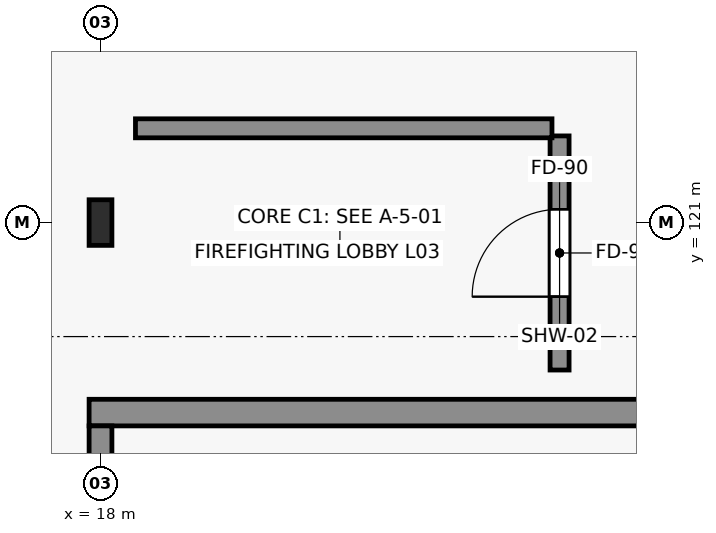
"""IFC4 building model, lengths in metres.
Left out: names, types, materials, properties, quantities, classifications, styles, units other than length and angle.
Written with IfcOpenShell. Run it as: python <this file> out.ifc"""

import sys

from ifc_helpers import new_model, si_unit, direction, frame, frame_2d, origin, origin_2d, place, context, subcontext, project, spatial, rectangle, i_section, extrude, element, fill, save


model = new_model("IFC4")
c1 = context("Model", 3, precision=1e-05, world=origin(), true_north=direction((0.0, 1.0)))
c2 = subcontext(c1, "Body", "Model", "MODEL_VIEW")
j1 = project(units=[si_unit("LENGTHUNIT", "METRE"), si_unit("PLANEANGLEUNIT", "RADIAN")], contexts=[c1])
p1 = place(None, origin())
s1 = spatial("IfcSite", under=j1, at=p1, CompositionType="ELEMENT")
p2 = place(p1, origin())
s2 = spatial("IfcBuilding", under=s1, at=p2, CompositionType="ELEMENT")
p3 = place(p2, frame((0.0, 0.0, 15.0)))
s3 = spatial("IfcBuildingStorey", under=s2, at=p3, CompositionType="ELEMENT", Elevation=15.0)
p4 = place(p3, frame((18.0, 121.0, 0.0), z_axis=(0.0, 0.0, 1.0), x_axis=(1.0, 0.0, 0.0)))
e1 = element("IfcColumn", 1, at=p4, inside=s3, PredefinedType="COLUMN", context=c2, shape_type="SweptSolid", body=[
    extrude(i_section(OverallWidth=0.3, OverallDepth=0.6, WebThickness=0.015, FlangeThickness=0.03, FilletRadius=0.027, at=origin_2d()), origin(), (0.0, 0.0, 1.0), 4.285),
])
p5 = place(p3, frame((17.85, 118.5, 0.0), z_axis=(0.0, 0.0, 1.0), x_axis=(1.0, 0.0, 0.0)))
e2 = element("IfcWall", 2, at=p5, inside=s3, PredefinedType="SHEAR", context=c2, shape_type="SweptSolid", body=[
    extrude(rectangle(XDim=9.3, YDim=0.35, at=frame_2d((4.65, 0.0))), origin(), (0.0, 0.0, 1.0), 4.285),
])
p6 = place(p3, frame((18.0, 113.5, 0.0), z_axis=(0.0, 0.0, 1.0), x_axis=(0.0, 1.0, 0.0)))
e3 = element("IfcWall", 3, at=p6, inside=s3, PredefinedType="SHEAR", context=c2, shape_type="SweptSolid", body=[
    extrude(rectangle(XDim=4.825, YDim=0.3, at=frame_2d((2.413, 0.0))), origin(), (0.0, 0.0, 1.0), 4.285),
])
p7 = place(p3, frame((24.04, 119.06, 0.0), z_axis=(0.0, 0.0, 1.0), x_axis=(0.0, 1.0, 0.0)))
e4 = element("IfcWall", 4, at=p7, inside=s3, PredefinedType="SOLIDWALL", context=c2, shape_type="SweptSolid", body=[
    extrude(rectangle(XDim=3.08, YDim=0.25, at=frame_2d((1.54, 0.0))), origin(), (0.0, 0.0, 1.0), 3.865),
])
p8 = place(p7, frame((0.965, 0.0, 0.0)))
e5 = element("IfcOpeningElement", 5, at=p8, cuts=e4, PredefinedType="OPENING", context=c2, shape_type="SweptSolid", body=[
    extrude(rectangle(XDim=1.15, YDim=2.2, at=frame_2d((0.575, 1.1))), frame((0.0, 0.135, 0.0), z_axis=(0.0, -1.0, 0.0), x_axis=(1.0, 0.0, 0.0)), (0.0, 0.0, 1.0), 0.27),
])
p9 = place(p3, frame((18.46, 122.24, 0.0), z_axis=(0.0, 0.0, 1.0), x_axis=(1.0, 0.0, 0.0)))
e6 = element("IfcWall", 6, at=p9, inside=s3, PredefinedType="SOLIDWALL", context=c2, shape_type="SweptSolid", body=[
    extrude(rectangle(XDim=5.48, YDim=0.25, at=frame_2d((2.74, 0.0))), origin(), (0.0, 0.0, 1.0), 4.035),
])
p10 = place(p8, origin())
e7 = element("IfcDoor", 7, at=p10, inside=s3, OperationType="SINGLE_SWING_LEFT", PredefinedType="DOOR", context=c2, shape_type="SweptSolid", body=[
    extrude(rectangle(XDim=1.15, YDim=2.2, at=frame_2d((0.575, 1.1))), frame((0.0, 0.025, 0.0), z_axis=(0.0, -1.0, 0.0), x_axis=(1.0, 0.0, 0.0)), (0.0, 0.0, 1.0), 0.05),
])
fill(e5, e7)
save(model, sys.argv[1])
